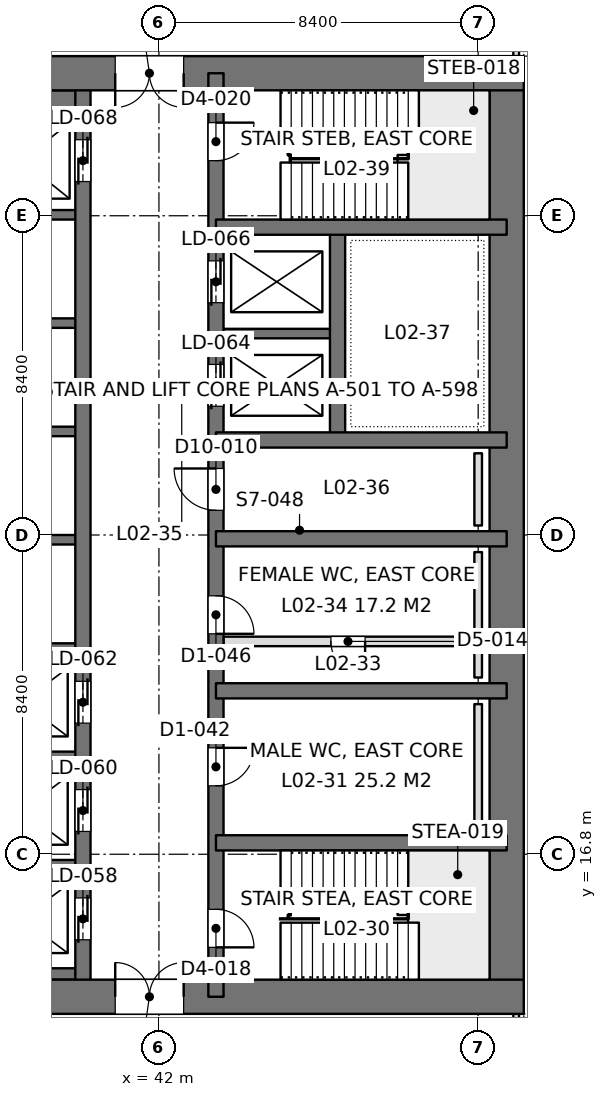
"""IFC4 building model, lengths in metres.
Left out: names, types, materials, properties, quantities, classifications, styles, units other than length and angle.
Written with IfcOpenShell. Run it as: python <this file> out.ifc"""

import sys

from ifc_helpers import new_model, si_unit, direction, frame, frame_2d, origin, place, context, subcontext, project, spatial, rectangle, extrude, element, fill, save


model = new_model("IFC4")
c1 = context("Model", 3, precision=1e-05, world=origin(), true_north=direction((0.0, 1.0)))
c2 = subcontext(c1, "Body", "Model", "MODEL_VIEW")
j1 = project(units=[si_unit("LENGTHUNIT", "METRE"), si_unit("PLANEANGLEUNIT", "RADIAN")], contexts=[c1])
p1 = place(None, origin())
s1 = spatial("IfcSite", under=j1, at=p1, CompositionType="ELEMENT")
p2 = place(p1, origin())
s2 = spatial("IfcBuilding", under=s1, at=p2, CompositionType="ELEMENT")
p3 = place(p2, frame((0.0, 0.0, 9.9)))
s3 = spatial("IfcBuildingStorey", under=s2, at=p3, CompositionType="ELEMENT", Elevation=9.9)
p4 = place(p3, frame((33.6, 13.05, 0.0), z_axis=(0.0, 0.0, 1.0), x_axis=(1.0, 0.0, 0.0)))
e1 = element("IfcWall", 1, at=p4, inside=s3, PredefinedType="SHEAR", context=c2, shape_type="SweptSolid", body=[
    extrude(rectangle(XDim=18.0, YDim=0.9, at=frame_2d((9.0, 0.0))), origin(), (0.0, 0.0, 1.0), 4.5),
])
p5 = place(p4, frame((7.25, 0.0, 0.0)))
e2 = element("IfcOpeningElement", 2, at=p5, cuts=e1, PredefinedType="OPENING", context=c2, shape_type="SweptSolid", body=[
    extrude(rectangle(XDim=1.8, YDim=2.4, at=frame_2d((0.9, 1.2))), frame((0.0, 0.46, 0.0), z_axis=(0.0, -1.0, 0.0), x_axis=(1.0, 0.0, 0.0)), (0.0, 0.0, 1.0), 0.92),
])
p6 = place(p3, frame((33.6, 37.35, 0.0), z_axis=(0.0, 0.0, 1.0), x_axis=(1.0, 0.0, 0.0)))
e3 = element("IfcWall", 3, at=p6, inside=s3, PredefinedType="SHEAR", context=c2, shape_type="SweptSolid", body=[
    extrude(rectangle(XDim=18.0, YDim=0.9, at=frame_2d((9.0, 0.0))), origin(), (0.0, 0.0, 1.0), 4.5),
])
p7 = place(p6, frame((7.25, 0.0, 0.0)))
e4 = element("IfcOpeningElement", 4, at=p7, cuts=e3, PredefinedType="OPENING", context=c2, shape_type="SweptSolid", body=[
    extrude(rectangle(XDim=1.8, YDim=2.4, at=frame_2d((0.9, 1.2))), frame((0.0, 0.46, 0.0), z_axis=(0.0, -1.0, 0.0), x_axis=(1.0, 0.0, 0.0)), (0.0, 0.0, 1.0), 0.92),
])
p8 = place(p3, frame((51.15, 13.05, 0.0), z_axis=(0.0, 0.0, 1.0), x_axis=(0.0, 1.0, 0.0)))
e5 = element("IfcWall", 5, at=p8, inside=s3, PredefinedType="SHEAR", context=c2, shape_type="SweptSolid", body=[
    extrude(rectangle(XDim=24.3, YDim=0.9, at=frame_2d((12.15, 0.0))), origin(), (0.0, 0.0, 1.0), 4.5),
])
p9 = place(p3, frame((43.5, 13.05, 0.0), z_axis=(0.0, 0.0, 1.0), x_axis=(0.0, 1.0, 0.0)))
e6 = element("IfcWall", 6, at=p9, inside=s3, PredefinedType="SHEAR", context=c2, shape_type="SweptSolid", body=[
    extrude(rectangle(XDim=24.3, YDim=0.4, at=frame_2d((12.15, 0.0))), origin(), (0.0, 0.0, 1.0), 4.5),
])
p10 = place(p9, frame((1.3, 0.0, 0.0)))
e7 = element("IfcOpeningElement", 7, at=p10, cuts=e6, PredefinedType="OPENING", context=c2, shape_type="SweptSolid", body=[
    extrude(rectangle(XDim=1.0, YDim=2.2, at=frame_2d((0.5, 1.1))), frame((0.0, 0.21, 0.0), z_axis=(0.0, -1.0, 0.0), x_axis=(1.0, 0.0, 0.0)), (0.0, 0.0, 1.0), 0.42),
])
p11 = place(p9, frame((22.0, 0.0, 0.0)))
e8 = element("IfcOpeningElement", 8, at=p11, cuts=e6, PredefinedType="OPENING", context=c2, shape_type="SweptSolid", body=[
    extrude(rectangle(XDim=1.0, YDim=2.2, at=frame_2d((0.5, 1.1))), frame((0.0, 0.21, 0.0), z_axis=(0.0, -1.0, 0.0), x_axis=(1.0, 0.0, 0.0)), (0.0, 0.0, 1.0), 0.42),
])
p12 = place(p9, frame((5.55, 0.0, 0.0)))
e9 = element("IfcOpeningElement", 9, at=p12, cuts=e6, PredefinedType="OPENING", context=c2, shape_type="SweptSolid", body=[
    extrude(rectangle(XDim=1.0, YDim=2.2, at=frame_2d((0.5, 1.1))), frame((0.0, 0.21, 0.0), z_axis=(0.0, -1.0, 0.0), x_axis=(1.0, 0.0, 0.0)), (0.0, 0.0, 1.0), 0.42),
])
p13 = place(p9, frame((9.55, 0.0, 0.0)))
e10 = element("IfcOpeningElement", 10, at=p13, cuts=e6, PredefinedType="OPENING", context=c2, shape_type="SweptSolid", body=[
    extrude(rectangle(XDim=1.0, YDim=2.2, at=frame_2d((0.5, 1.1))), frame((0.0, 0.21, 0.0), z_axis=(0.0, -1.0, 0.0), x_axis=(1.0, 0.0, 0.0)), (0.0, 0.0, 1.0), 0.42),
])
p14 = place(p9, frame((12.8, 0.0, 0.0)))
e11 = element("IfcOpeningElement", 11, at=p14, cuts=e6, PredefinedType="OPENING", context=c2, shape_type="SweptSolid", body=[
    extrude(rectangle(XDim=1.1, YDim=2.2, at=frame_2d((0.55, 1.1))), frame((0.0, 0.21, 0.0), z_axis=(0.0, -1.0, 0.0), x_axis=(1.0, 0.0, 0.0)), (0.0, 0.0, 1.0), 0.42),
])
p15 = place(p9, frame((15.538, 0.0, 0.0)))
e12 = element("IfcOpeningElement", 12, at=p15, cuts=e6, PredefinedType="OPENING", context=c2, shape_type="SweptSolid", body=[
    extrude(rectangle(XDim=1.1, YDim=2.2, at=frame_2d((0.55, 1.1))), frame((0.0, 0.21, 0.0), z_axis=(0.0, -1.0, 0.0), x_axis=(1.0, 0.0, 0.0)), (0.0, 0.0, 1.0), 0.42),
])
p16 = place(p9, frame((18.262, 0.0, 0.0)))
e13 = element("IfcOpeningElement", 13, at=p16, cuts=e6, PredefinedType="OPENING", context=c2, shape_type="SweptSolid", body=[
    extrude(rectangle(XDim=1.1, YDim=2.2, at=frame_2d((0.55, 1.1))), frame((0.0, 0.21, 0.0), z_axis=(0.0, -1.0, 0.0), x_axis=(1.0, 0.0, 0.0)), (0.0, 0.0, 1.0), 0.42),
])
p17 = place(p3, frame((40.0, 13.05, 0.0), z_axis=(0.0, 0.0, 1.0), x_axis=(0.0, 1.0, 0.0)))
e14 = element("IfcWall", 14, at=p17, inside=s3, PredefinedType="SHEAR", context=c2, shape_type="SweptSolid", body=[
    extrude(rectangle(XDim=24.3, YDim=0.4, at=frame_2d((12.15, 0.0))), origin(), (0.0, 0.0, 1.0), 4.5),
])
p18 = place(p17, frame((1.5, 0.0, 0.0)))
e15 = element("IfcOpeningElement", 15, at=p18, cuts=e14, PredefinedType="OPENING", context=c2, shape_type="SweptSolid", body=[
    extrude(rectangle(XDim=1.1, YDim=2.2, at=frame_2d((0.55, 1.1))), frame((0.0, 0.21, 0.0), z_axis=(0.0, -1.0, 0.0), x_axis=(1.0, 0.0, 0.0)), (0.0, 0.0, 1.0), 0.42),
])
p19 = place(p17, frame((4.35, 0.0, 0.0)))
e16 = element("IfcOpeningElement", 16, at=p19, cuts=e14, PredefinedType="OPENING", context=c2, shape_type="SweptSolid", body=[
    extrude(rectangle(XDim=1.1, YDim=2.2, at=frame_2d((0.55, 1.1))), frame((0.0, 0.21, 0.0), z_axis=(0.0, -1.0, 0.0), x_axis=(1.0, 0.0, 0.0)), (0.0, 0.0, 1.0), 0.42),
])
p20 = place(p17, frame((7.2, 0.0, 0.0)))
e17 = element("IfcOpeningElement", 17, at=p20, cuts=e14, PredefinedType="OPENING", context=c2, shape_type="SweptSolid", body=[
    extrude(rectangle(XDim=1.1, YDim=2.2, at=frame_2d((0.55, 1.1))), frame((0.0, 0.21, 0.0), z_axis=(0.0, -1.0, 0.0), x_axis=(1.0, 0.0, 0.0)), (0.0, 0.0, 1.0), 0.42),
])
p21 = place(p17, frame((21.45, 0.0, 0.0)))
e18 = element("IfcOpeningElement", 18, at=p21, cuts=e14, PredefinedType="OPENING", context=c2, shape_type="SweptSolid", body=[
    extrude(rectangle(XDim=1.1, YDim=2.2, at=frame_2d((0.55, 1.1))), frame((0.0, 0.21, 0.0), z_axis=(0.0, -1.0, 0.0), x_axis=(1.0, 0.0, 0.0)), (0.0, 0.0, 1.0), 0.42),
])
for number, where, z_axis, x_axis in (
    (19, (51.15, 17.1, 0.0), (0.0, 0.0, 1.0), (-1.0, 0.0, 0.0)),
    (20, (51.15, 21.1, 0.0), (0.0, 0.0, 1.0), (-1.0, 0.0, 0.0)),
    (21, (51.15, 25.1, 0.0), (0.0, 0.0, 1.0), (-1.0, 0.0, 0.0)),
    (22, (51.15, 27.7, 0.0), (0.0, 0.0, 1.0), (-1.0, 0.0, 0.0)),
    (23, (51.15, 33.3, 0.0), (0.0, 0.0, 1.0), (-1.0, 0.0, 0.0)),
):
    element("IfcWall", number, at=place(p3, frame(where, z_axis=z_axis, x_axis=x_axis)), inside=s3, PredefinedType="SHEAR", context=c2, shape_type="SweptSolid", body=[
        extrude(rectangle(XDim=7.65, YDim=0.4, at=frame_2d((3.825, 0.0))), origin(), (0.0, 0.0, 1.0), 4.5),
    ])
p22 = place(p3, frame((46.7, 27.7, 0.0), z_axis=(0.0, 0.0, 1.0), x_axis=(0.0, 1.0, 0.0)))
e24 = element("IfcWall", 24, at=p22, inside=s3, PredefinedType="SHEAR", context=c2, shape_type="SweptSolid", body=[
    extrude(rectangle(XDim=5.6, YDim=0.4, at=frame_2d((2.8, 0.0))), origin(), (0.0, 0.0, 1.0), 4.5),
])
p23 = place(p3, frame((46.7, 30.5, 0.0), z_axis=(0.0, 0.0, 1.0), x_axis=(-1.0, 0.0, 0.0)))
e25 = element("IfcWall", 25, at=p23, inside=s3, PredefinedType="SHEAR", context=c2, shape_type="SweptSolid", body=[
    extrude(rectangle(XDim=3.2, YDim=0.25, at=frame_2d((1.6, 0.0))), origin(), (0.0, 0.0, 1.0), 4.5),
])
p24 = place(p3, frame((40.0, 13.65, 0.0), z_axis=(0.0, 0.0, 1.0), x_axis=(-1.0, 0.0, 0.0)))
e26 = element("IfcWall", 26, at=p24, inside=s3, PredefinedType="SHEAR", context=c2, shape_type="SweptSolid", body=[
    extrude(rectangle(XDim=3.2, YDim=0.3, at=frame_2d((1.6, 0.0))), origin(), (0.0, 0.0, 1.0), 4.5),
])
for number, where, z_axis, x_axis in (
    (27, (40.0, 16.525, 0.0), (0.0, 0.0, 1.0), (-1.0, 0.0, 0.0)),
    (28, (40.0, 19.375, 0.0), (0.0, 0.0, 1.0), (-1.0, 0.0, 0.0)),
    (29, (40.0, 22.225, 0.0), (0.0, 0.0, 1.0), (-1.0, 0.0, 0.0)),
    (30, (40.0, 25.075, 0.0), (0.0, 0.0, 1.0), (-1.0, 0.0, 0.0)),
    (31, (40.0, 27.925, 0.0), (0.0, 0.0, 1.0), (-1.0, 0.0, 0.0)),
    (32, (40.0, 30.775, 0.0), (0.0, 0.0, 1.0), (-1.0, 0.0, 0.0)),
    (33, (40.0, 33.625, 0.0), (0.0, 0.0, 1.0), (-1.0, 0.0, 0.0)),
):
    element("IfcWall", number, at=place(p3, frame(where, z_axis=z_axis, x_axis=x_axis)), inside=s3, PredefinedType="SHEAR", context=c2, shape_type="SweptSolid", body=[
        extrude(rectangle(XDim=3.2, YDim=0.25, at=frame_2d((1.6, 0.0))), origin(), (0.0, 0.0, 1.0), 4.5),
    ])
p25 = place(p3, frame((40.0, 36.625, 0.0), z_axis=(0.0, 0.0, 1.0), x_axis=(-1.0, 0.0, 0.0)))
e34 = element("IfcWall", 34, at=p25, inside=s3, PredefinedType="SHEAR", context=c2, shape_type="SweptSolid", body=[
    extrude(rectangle(XDim=3.2, YDim=0.55, at=frame_2d((1.6, 0.0))), origin(), (0.0, 0.0, 1.0), 4.5),
])
p26 = place(p3, frame((51.4, 6.12, 0.0), z_axis=(0.0, 0.0, 1.0), x_axis=(0.0, 1.0, 0.0)))
e35 = element("IfcWall", 35, at=p26, inside=s3, PredefinedType="PARTITIONING", context=c2, shape_type="SweptSolid", body=[
    extrude(rectangle(XDim=6.482, YDim=0.15, at=frame_2d((3.241, 0.0))), origin(), (0.0, 0.0, 1.0), 3.65),
])
p27 = place(p26, frame((3.88, 0.0, 0.0)))
e36 = element("IfcOpeningElement", 36, at=p27, cuts=e35, PredefinedType="OPENING", context=c2, shape_type="SweptSolid", body=[
    extrude(rectangle(XDim=1.0, YDim=2.2, at=frame_2d((0.5, 1.1))), frame((0.0, 0.085, 0.0), z_axis=(0.0, -1.0, 0.0), x_axis=(1.0, 0.0, 0.0)), (0.0, 0.0, 1.0), 0.17),
])
p28 = place(p3, frame((51.4, 37.8, 0.0), z_axis=(0.0, 0.0, 1.0), x_axis=(0.0, 1.0, 0.0)))
e37 = element("IfcWall", 37, at=p28, inside=s3, PredefinedType="PARTITIONING", context=c2, shape_type="SweptSolid", body=[
    extrude(rectangle(XDim=13.526, YDim=0.15, at=frame_2d((6.763, 0.0))), origin(), (0.0, 0.0, 1.0), 3.65),
])
p29 = place(p28, frame((7.9, 0.0, 0.0)))
e38 = element("IfcOpeningElement", 38, at=p29, cuts=e37, PredefinedType="OPENING", context=c2, shape_type="SweptSolid", body=[
    extrude(rectangle(XDim=1.0, YDim=2.2, at=frame_2d((0.5, 1.1))), frame((0.0, 0.085, 0.0), z_axis=(0.0, -1.0, 0.0), x_axis=(1.0, 0.0, 0.0)), (0.0, 0.0, 1.0), 0.17),
])
p30 = place(p3, frame((43.7, 22.4, 0.0), z_axis=(0.0, 0.0, 1.0), x_axis=(1.0, 0.0, 0.0)))
e39 = element("IfcWall", 39, at=p30, inside=s3, PredefinedType="PARTITIONING", context=c2, shape_type="SweptSolid", body=[
    extrude(rectangle(XDim=6.6, YDim=0.25, at=frame_2d((3.3, 0.0))), origin(), (0.0, 0.0, 1.0), 4.3),
])
p31 = place(p30, frame((2.825, 0.0, 0.0)))
e40 = element("IfcOpeningElement", 40, at=p31, cuts=e39, PredefinedType="OPENING", context=c2, shape_type="SweptSolid", body=[
    extrude(rectangle(XDim=0.9, YDim=2.2, at=frame_2d((0.45, 1.1))), frame((0.0, 0.135, 0.0), z_axis=(0.0, -1.0, 0.0), x_axis=(1.0, 0.0, 0.0)), (0.0, 0.0, 1.0), 0.27),
])
for number, where, z_axis, x_axis in (
    (41, (50.4, 17.45, 0.0), (0.0, 0.0, 1.0), (0.0, 1.0, 0.0)),
    (42, (50.4, 21.45, 0.0), (0.0, 0.0, 1.0), (0.0, 1.0, 0.0)),
):
    element("IfcWall", number, at=place(p3, frame(where, z_axis=z_axis, x_axis=x_axis)), inside=s3, PredefinedType="PLUMBINGWALL", context=c2, shape_type="SweptSolid", body=[
        extrude(rectangle(XDim=3.3, YDim=0.2, at=frame_2d((1.65, 0.0))), origin(), (0.0, 0.0, 1.0), 1.2),
    ])
p32 = place(p3, frame((50.4, 25.45, 0.0), z_axis=(0.0, 0.0, 1.0), x_axis=(0.0, 1.0, 0.0)))
e43 = element("IfcWall", 43, at=p32, inside=s3, PredefinedType="PLUMBINGWALL", context=c2, shape_type="SweptSolid", body=[
    extrude(rectangle(XDim=1.9, YDim=0.2, at=frame_2d((0.95, 0.0))), origin(), (0.0, 0.0, 1.0), 1.2),
])
p33 = place(p5, origin())
e44 = element("IfcDoor", 44, at=p33, inside=s3, OperationType="DOUBLE_DOOR_SINGLE_SWING", PredefinedType="DOOR", context=c2, shape_type="SweptSolid", body=[
    extrude(rectangle(XDim=1.8, YDim=2.4, at=frame_2d((0.9, 1.2))), frame((0.0, 0.025, 0.0), z_axis=(0.0, -1.0, 0.0), x_axis=(1.0, 0.0, 0.0)), (0.0, 0.0, 1.0), 0.05),
])
fill(e2, e44)
p34 = place(p7, frame((1.8, 0.0, 0.0), z_axis=(0.0, 0.0, 1.0), x_axis=(-1.0, 0.0, 0.0)))
e45 = element("IfcDoor", 45, at=p34, inside=s3, OperationType="DOUBLE_DOOR_SINGLE_SWING", PredefinedType="DOOR", context=c2, shape_type="SweptSolid", body=[
    extrude(rectangle(XDim=1.8, YDim=2.4, at=frame_2d((0.9, 1.2))), frame((0.0, 0.025, 0.0), z_axis=(0.0, -1.0, 0.0), x_axis=(1.0, 0.0, 0.0)), (0.0, 0.0, 1.0), 0.05),
])
fill(e4, e45)
p35 = place(p10, frame((1.0, 0.0, 0.0), z_axis=(0.0, 0.0, 1.0), x_axis=(-1.0, 0.0, 0.0)))
e46 = element("IfcDoor", 46, at=p35, inside=s3, OperationType="SINGLE_SWING_RIGHT", PredefinedType="DOOR", context=c2, shape_type="SweptSolid", body=[
    extrude(rectangle(XDim=1.0, YDim=2.2, at=frame_2d((0.5, 1.1))), frame((0.0, 0.025, 0.0), z_axis=(0.0, -1.0, 0.0), x_axis=(1.0, 0.0, 0.0)), (0.0, 0.0, 1.0), 0.05),
])
fill(e7, e46)
p36 = place(p11, frame((1.0, 0.0, 0.0), z_axis=(0.0, 0.0, 1.0), x_axis=(-1.0, 0.0, 0.0)))
e47 = element("IfcDoor", 47, at=p36, inside=s3, OperationType="SINGLE_SWING_LEFT", PredefinedType="DOOR", context=c2, shape_type="SweptSolid", body=[
    extrude(rectangle(XDim=1.0, YDim=2.2, at=frame_2d((0.5, 1.1))), frame((0.0, 0.025, 0.0), z_axis=(0.0, -1.0, 0.0), x_axis=(1.0, 0.0, 0.0)), (0.0, 0.0, 1.0), 0.05),
])
fill(e8, e47)
p37 = place(p12, frame((1.0, 0.0, 0.0), z_axis=(0.0, 0.0, 1.0), x_axis=(-1.0, 0.0, 0.0)))
e48 = element("IfcDoor", 48, at=p37, inside=s3, OperationType="SINGLE_SWING_LEFT", PredefinedType="DOOR", context=c2, shape_type="SweptSolid", body=[
    extrude(rectangle(XDim=1.0, YDim=2.2, at=frame_2d((0.5, 1.1))), frame((0.0, 0.025, 0.0), z_axis=(0.0, -1.0, 0.0), x_axis=(1.0, 0.0, 0.0)), (0.0, 0.0, 1.0), 0.05),
])
fill(e9, e48)
p38 = place(p13, frame((1.0, 0.0, 0.0), z_axis=(0.0, 0.0, 1.0), x_axis=(-1.0, 0.0, 0.0)))
e49 = element("IfcDoor", 49, at=p38, inside=s3, OperationType="SINGLE_SWING_RIGHT", PredefinedType="DOOR", context=c2, shape_type="SweptSolid", body=[
    extrude(rectangle(XDim=1.0, YDim=2.2, at=frame_2d((0.5, 1.1))), frame((0.0, 0.025, 0.0), z_axis=(0.0, -1.0, 0.0), x_axis=(1.0, 0.0, 0.0)), (0.0, 0.0, 1.0), 0.05),
])
fill(e10, e49)
p39 = place(p14, origin())
e50 = element("IfcDoor", 50, at=p39, inside=s3, OperationType="SINGLE_SWING_RIGHT", PredefinedType="DOOR", context=c2, shape_type="SweptSolid", body=[
    extrude(rectangle(XDim=1.1, YDim=2.2, at=frame_2d((0.55, 1.1))), frame((0.0, 0.025, 0.0), z_axis=(0.0, -1.0, 0.0), x_axis=(1.0, 0.0, 0.0)), (0.0, 0.0, 1.0), 0.05),
])
fill(e11, e50)
p40 = place(p18, origin())
e51 = element("IfcDoor", 51, at=p40, inside=s3, OperationType="DOUBLE_DOOR_SLIDING", PredefinedType="DOOR", context=c2, shape_type="SweptSolid", body=[
    extrude(rectangle(XDim=1.1, YDim=2.2, at=frame_2d((0.55, 1.1))), frame((0.0, 0.025, 0.0), z_axis=(0.0, -1.0, 0.0), x_axis=(1.0, 0.0, 0.0)), (0.0, 0.0, 1.0), 0.05),
])
fill(e15, e51)
p41 = place(p19, origin())
e52 = element("IfcDoor", 52, at=p41, inside=s3, OperationType="DOUBLE_DOOR_SLIDING", PredefinedType="DOOR", context=c2, shape_type="SweptSolid", body=[
    extrude(rectangle(XDim=1.1, YDim=2.2, at=frame_2d((0.55, 1.1))), frame((0.0, 0.025, 0.0), z_axis=(0.0, -1.0, 0.0), x_axis=(1.0, 0.0, 0.0)), (0.0, 0.0, 1.0), 0.05),
])
fill(e16, e52)
p42 = place(p20, origin())
e53 = element("IfcDoor", 53, at=p42, inside=s3, OperationType="DOUBLE_DOOR_SLIDING", PredefinedType="DOOR", context=c2, shape_type="SweptSolid", body=[
    extrude(rectangle(XDim=1.1, YDim=2.2, at=frame_2d((0.55, 1.1))), frame((0.0, 0.025, 0.0), z_axis=(0.0, -1.0, 0.0), x_axis=(1.0, 0.0, 0.0)), (0.0, 0.0, 1.0), 0.05),
])
fill(e17, e53)
p43 = place(p21, origin())
e54 = element("IfcDoor", 54, at=p43, inside=s3, OperationType="DOUBLE_DOOR_SLIDING", PredefinedType="DOOR", context=c2, shape_type="SweptSolid", body=[
    extrude(rectangle(XDim=1.1, YDim=2.2, at=frame_2d((0.55, 1.1))), frame((0.0, 0.025, 0.0), z_axis=(0.0, -1.0, 0.0), x_axis=(1.0, 0.0, 0.0)), (0.0, 0.0, 1.0), 0.05),
])
fill(e18, e54)
p44 = place(p15, origin())
e55 = element("IfcDoor", 55, at=p44, inside=s3, OperationType="DOUBLE_DOOR_SLIDING", PredefinedType="DOOR", context=c2, shape_type="SweptSolid", body=[
    extrude(rectangle(XDim=1.1, YDim=2.2, at=frame_2d((0.55, 1.1))), frame((0.0, 0.025, 0.0), z_axis=(0.0, -1.0, 0.0), x_axis=(1.0, 0.0, 0.0)), (0.0, 0.0, 1.0), 0.05),
])
fill(e12, e55)
p45 = place(p16, origin())
e56 = element("IfcDoor", 56, at=p45, inside=s3, OperationType="DOUBLE_DOOR_SLIDING", PredefinedType="DOOR", context=c2, shape_type="SweptSolid", body=[
    extrude(rectangle(XDim=1.1, YDim=2.2, at=frame_2d((0.55, 1.1))), frame((0.0, 0.025, 0.0), z_axis=(0.0, -1.0, 0.0), x_axis=(1.0, 0.0, 0.0)), (0.0, 0.0, 1.0), 0.05),
])
fill(e13, e56)
p46 = place(p31, frame((0.9, 0.0, 0.0), z_axis=(0.0, 0.0, 1.0), x_axis=(-1.0, 0.0, 0.0)))
e57 = element("IfcDoor", 57, at=p46, inside=s3, OperationType="SINGLE_SWING_LEFT", PredefinedType="DOOR", context=c2, shape_type="SweptSolid", body=[
    extrude(rectangle(XDim=0.9, YDim=2.2, at=frame_2d((0.45, 1.1))), frame((0.0, 0.025, 0.0), z_axis=(0.0, -1.0, 0.0), x_axis=(1.0, 0.0, 0.0)), (0.0, 0.0, 1.0), 0.05),
])
fill(e40, e57)
save(model, sys.argv[1])
